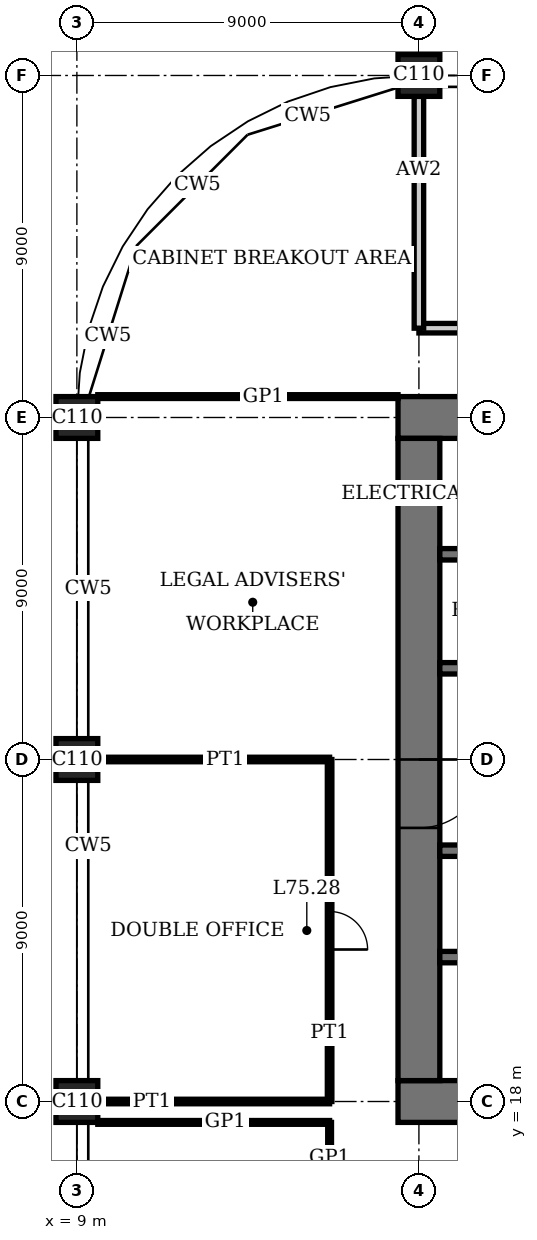
"""IFC4 building model, lengths in metres.
Left out: names, types, materials, properties, quantities, classifications, styles, units other than length and angle.
Written with IfcOpenShell. Run it as: python <this file> out.ifc"""

import sys

from ifc_helpers import new_model, si_unit, direction, frame, frame_2d, origin, origin_2d, place, context, subcontext, project, spatial, rectangle, extrude, element, fill, save


model = new_model("IFC4")
c1 = context("Model", 3, precision=1e-05, world=origin(), true_north=direction((0.0, 1.0)))
c2 = subcontext(c1, "Body", "Model", "MODEL_VIEW")
j1 = project(units=[si_unit("LENGTHUNIT", "METRE"), si_unit("PLANEANGLEUNIT", "RADIAN")], contexts=[c1])
p1 = place(None, origin())
s1 = spatial("IfcSite", under=j1, at=p1, CompositionType="ELEMENT")
p2 = place(p1, origin())
s2 = spatial("IfcBuilding", under=s1, at=p2, CompositionType="ELEMENT")
p3 = place(p2, frame((0.0, 0.0, 307.4)))
s3 = spatial("IfcBuildingStorey", under=s2, at=p3, CompositionType="ELEMENT", Elevation=307.4)
for number, where, z_axis, x_axis in (
    (1, (9.0, 18.0, 0.0), (0.0, 0.0, 1.0), (1.0, 0.0, 0.0)),
    (2, (9.0, 27.0, 0.0), (0.0, 0.0, 1.0), (1.0, 0.0, 0.0)),
    (3, (9.0, 36.0, 0.0), (0.0, 0.0, 1.0), (1.0, 0.0, 0.0)),
    (4, (18.0, 45.0, 0.0), (0.0, 0.0, 1.0), (1.0, 0.0, 0.0)),
):
    element("IfcColumn", number, at=place(p3, frame(where, z_axis=z_axis, x_axis=x_axis)), inside=s3, PredefinedType="COLUMN", context=c2, shape_type="SweptSolid", body=[
        extrude(rectangle(XDim=1.1, YDim=1.1, at=origin_2d()), origin(), (0.0, 0.0, 1.0), 4.4),
    ])
p4 = place(p3, frame((17.45, 18.0, 0.0), z_axis=(0.0, 0.0, 1.0), x_axis=(1.0, 0.0, 0.0)))
e5 = element("IfcWall", 5, at=p4, inside=s3, PredefinedType="SHEAR", context=c2, shape_type="SweptSolid", body=[
    extrude(rectangle(XDim=28.1, YDim=1.1, at=frame_2d((14.05, 0.0))), origin(), (0.0, 0.0, 1.0), 4.4),
])
p5 = place(p4, frame((11.55, 0.0, 0.0)))
e6 = element("IfcOpeningElement", 6, at=p5, cuts=e5, PredefinedType="OPENING", context=c2, shape_type="SweptSolid", body=[
    extrude(rectangle(XDim=1.0, YDim=2.4, at=frame_2d((0.5, 1.2))), frame((0.0, 0.56, 0.0), z_axis=(0.0, -1.0, 0.0), x_axis=(1.0, 0.0, 0.0)), (0.0, 0.0, 1.0), 1.12),
])
p6 = place(p4, frame((16.55, 0.0, 0.0)))
e7 = element("IfcOpeningElement", 7, at=p6, cuts=e5, PredefinedType="OPENING", context=c2, shape_type="SweptSolid", body=[
    extrude(rectangle(XDim=1.0, YDim=2.4, at=frame_2d((0.5, 1.2))), frame((0.0, 0.56, 0.0), z_axis=(0.0, -1.0, 0.0), x_axis=(1.0, 0.0, 0.0)), (0.0, 0.0, 1.0), 1.12),
])
p7 = place(p4, frame((20.0, 0.0, 0.0)))
e8 = element("IfcOpeningElement", 8, at=p7, cuts=e5, PredefinedType="OPENING", context=c2, shape_type="SweptSolid", body=[
    extrude(rectangle(XDim=1.1, YDim=2.4, at=frame_2d((0.55, 1.2))), frame((0.0, 0.56, 0.0), z_axis=(0.0, -1.0, 0.0), x_axis=(1.0, 0.0, 0.0)), (0.0, 0.0, 1.0), 1.12),
])
p8 = place(p4, frame((24.05, 0.0, 0.0)))
e9 = element("IfcOpeningElement", 9, at=p8, cuts=e5, PredefinedType="OPENING", context=c2, shape_type="SweptSolid", body=[
    extrude(rectangle(XDim=1.0, YDim=2.4, at=frame_2d((0.5, 1.2))), frame((0.0, 0.56, 0.0), z_axis=(0.0, -1.0, 0.0), x_axis=(1.0, 0.0, 0.0)), (0.0, 0.0, 1.0), 1.12),
])
p9 = place(p3, frame((45.55, 36.0, 0.0), z_axis=(0.0, 0.0, 1.0), x_axis=(-1.0, 0.0, 0.0)))
e10 = element("IfcWall", 10, at=p9, inside=s3, PredefinedType="SHEAR", context=c2, shape_type="SweptSolid", body=[
    extrude(rectangle(XDim=28.1, YDim=1.1, at=frame_2d((14.05, 0.0))), origin(), (0.0, 0.0, 1.0), 4.4),
])
p10 = place(p9, frame((11.55, 0.0, 0.0)))
e11 = element("IfcOpeningElement", 11, at=p10, cuts=e10, PredefinedType="OPENING", context=c2, shape_type="SweptSolid", body=[
    extrude(rectangle(XDim=1.0, YDim=2.4, at=frame_2d((0.5, 1.2))), frame((0.0, 0.56, 0.0), z_axis=(0.0, -1.0, 0.0), x_axis=(1.0, 0.0, 0.0)), (0.0, 0.0, 1.0), 1.12),
])
p11 = place(p9, frame((16.55, 0.0, 0.0)))
e12 = element("IfcOpeningElement", 12, at=p11, cuts=e10, PredefinedType="OPENING", context=c2, shape_type="SweptSolid", body=[
    extrude(rectangle(XDim=1.0, YDim=2.4, at=frame_2d((0.5, 1.2))), frame((0.0, 0.56, 0.0), z_axis=(0.0, -1.0, 0.0), x_axis=(1.0, 0.0, 0.0)), (0.0, 0.0, 1.0), 1.12),
])
p12 = place(p9, frame((20.0, 0.0, 0.0)))
e13 = element("IfcOpeningElement", 13, at=p12, cuts=e10, PredefinedType="OPENING", context=c2, shape_type="SweptSolid", body=[
    extrude(rectangle(XDim=1.1, YDim=2.4, at=frame_2d((0.55, 1.2))), frame((0.0, 0.56, 0.0), z_axis=(0.0, -1.0, 0.0), x_axis=(1.0, 0.0, 0.0)), (0.0, 0.0, 1.0), 1.12),
])
p13 = place(p9, frame((24.05, 0.0, 0.0)))
e14 = element("IfcOpeningElement", 14, at=p13, cuts=e10, PredefinedType="OPENING", context=c2, shape_type="SweptSolid", body=[
    extrude(rectangle(XDim=1.0, YDim=2.4, at=frame_2d((0.5, 1.2))), frame((0.0, 0.56, 0.0), z_axis=(0.0, -1.0, 0.0), x_axis=(1.0, 0.0, 0.0)), (0.0, 0.0, 1.0), 1.12),
])
p14 = place(p3, frame((18.0, 35.45, 0.0), z_axis=(0.0, 0.0, 1.0), x_axis=(0.0, -1.0, 0.0)))
e15 = element("IfcWall", 15, at=p14, inside=s3, PredefinedType="SHEAR", context=c2, shape_type="SweptSolid", body=[
    extrude(rectangle(XDim=16.9, YDim=1.1, at=frame_2d((8.45, 0.0))), origin(), (0.0, 0.0, 1.0), 4.4),
])
p15 = place(p14, frame((8.45, 0.0, 0.0)))
e16 = element("IfcOpeningElement", 16, at=p15, cuts=e15, PredefinedType="OPENING", context=c2, shape_type="SweptSolid", body=[
    extrude(rectangle(XDim=1.8, YDim=2.4, at=frame_2d((0.9, 1.2))), frame((0.0, 0.56, 0.0), z_axis=(0.0, -1.0, 0.0), x_axis=(1.0, 0.0, 0.0)), (0.0, 0.0, 1.0), 1.12),
])
p16 = place(p3, frame((18.55, 21.8, 0.0), z_axis=(0.0, 0.0, 1.0), x_axis=(1.0, 0.0, 0.0)))
e17 = element("IfcWall", 17, at=p16, inside=s3, PredefinedType="SHEAR", context=c2, shape_type="SweptSolid", body=[
    extrude(rectangle(XDim=8.3, YDim=0.3, at=frame_2d((4.15, 0.0))), origin(), (0.0, 0.0, 1.0), 4.4),
])
p17 = place(p16, frame((6.85, 0.0, 0.0)))
e18 = element("IfcOpeningElement", 18, at=p17, cuts=e17, PredefinedType="OPENING", context=c2, shape_type="SweptSolid", body=[
    extrude(rectangle(XDim=1.0, YDim=2.4, at=frame_2d((0.5, 1.2))), frame((0.0, 0.16, 0.0), z_axis=(0.0, -1.0, 0.0), x_axis=(1.0, 0.0, 0.0)), (0.0, 0.0, 1.0), 0.32),
])
p18 = place(p3, frame((18.55, 24.6, 0.0), z_axis=(0.0, 0.0, 1.0), x_axis=(1.0, 0.0, 0.0)))
e19 = element("IfcWall", 19, at=p18, inside=s3, PredefinedType="SHEAR", context=c2, shape_type="SweptSolid", body=[
    extrude(rectangle(XDim=25.9, YDim=0.3, at=frame_2d((12.95, 0.0))), origin(), (0.0, 0.0, 1.0), 4.4),
])
p19 = place(p18, frame((4.95, 0.0, 0.0)))
e20 = element("IfcOpeningElement", 20, at=p19, cuts=e19, PredefinedType="OPENING", context=c2, shape_type="SweptSolid", body=[
    extrude(rectangle(XDim=1.0, YDim=2.4, at=frame_2d((0.5, 1.2))), frame((0.0, 0.16, 0.0), z_axis=(0.0, -1.0, 0.0), x_axis=(1.0, 0.0, 0.0)), (0.0, 0.0, 1.0), 0.32),
])
p20 = place(p18, frame((24.5, 0.0, 0.0)))
e21 = element("IfcOpeningElement", 21, at=p20, cuts=e19, PredefinedType="OPENING", context=c2, shape_type="SweptSolid", body=[
    extrude(rectangle(XDim=0.9, YDim=2.1, at=frame_2d((0.45, 1.05))), frame((0.0, 0.16, 0.0), z_axis=(0.0, -1.0, 0.0), x_axis=(1.0, 0.0, 0.0)), (0.0, 0.0, 1.0), 0.32),
])
p21 = place(p18, frame((9.4, 0.0, 0.0)))
e22 = element("IfcOpeningElement", 22, at=p21, cuts=e19, PredefinedType="OPENING", context=c2, shape_type="SweptSolid", body=[
    extrude(rectangle(XDim=1.1, YDim=2.4, at=frame_2d((0.55, 1.2))), frame((0.0, 0.16, 0.0), z_axis=(0.0, -1.0, 0.0), x_axis=(1.0, 0.0, 0.0)), (0.0, 0.0, 1.0), 0.32),
])
p22 = place(p18, frame((12.4, 0.0, 0.0)))
e23 = element("IfcOpeningElement", 23, at=p22, cuts=e19, PredefinedType="OPENING", context=c2, shape_type="SweptSolid", body=[
    extrude(rectangle(XDim=1.1, YDim=2.4, at=frame_2d((0.55, 1.2))), frame((0.0, 0.16, 0.0), z_axis=(0.0, -1.0, 0.0), x_axis=(1.0, 0.0, 0.0)), (0.0, 0.0, 1.0), 0.32),
])
p23 = place(p18, frame((15.4, 0.0, 0.0)))
e24 = element("IfcOpeningElement", 24, at=p23, cuts=e19, PredefinedType="OPENING", context=c2, shape_type="SweptSolid", body=[
    extrude(rectangle(XDim=1.1, YDim=2.4, at=frame_2d((0.55, 1.2))), frame((0.0, 0.16, 0.0), z_axis=(0.0, -1.0, 0.0), x_axis=(1.0, 0.0, 0.0)), (0.0, 0.0, 1.0), 0.32),
])
p24 = place(p18, frame((18.4, 0.0, 0.0)))
e25 = element("IfcOpeningElement", 25, at=p24, cuts=e19, PredefinedType="OPENING", context=c2, shape_type="SweptSolid", body=[
    extrude(rectangle(XDim=1.1, YDim=2.4, at=frame_2d((0.55, 1.2))), frame((0.0, 0.16, 0.0), z_axis=(0.0, -1.0, 0.0), x_axis=(1.0, 0.0, 0.0)), (0.0, 0.0, 1.0), 0.32),
])
p25 = place(p18, frame((21.3, 0.0, 0.0)))
e26 = element("IfcOpeningElement", 26, at=p25, cuts=e19, PredefinedType="OPENING", context=c2, shape_type="SweptSolid", body=[
    extrude(rectangle(XDim=1.3, YDim=2.4, at=frame_2d((0.65, 1.2))), frame((0.0, 0.16, 0.0), z_axis=(0.0, -1.0, 0.0), x_axis=(1.0, 0.0, 0.0)), (0.0, 0.0, 1.0), 0.32),
])
p26 = place(p3, frame((18.55, 29.4, 0.0), z_axis=(0.0, 0.0, 1.0), x_axis=(1.0, 0.0, 0.0)))
e27 = element("IfcWall", 27, at=p26, inside=s3, PredefinedType="SHEAR", context=c2, shape_type="SweptSolid", body=[
    extrude(rectangle(XDim=25.9, YDim=0.3, at=frame_2d((12.95, 0.0))), origin(), (0.0, 0.0, 1.0), 4.4),
])
p27 = place(p26, frame((19.95, 0.0, 0.0)))
e28 = element("IfcOpeningElement", 28, at=p27, cuts=e27, PredefinedType="OPENING", context=c2, shape_type="SweptSolid", body=[
    extrude(rectangle(XDim=1.0, YDim=2.4, at=frame_2d((0.5, 1.2))), frame((0.0, 0.16, 0.0), z_axis=(0.0, -1.0, 0.0), x_axis=(1.0, 0.0, 0.0)), (0.0, 0.0, 1.0), 0.32),
])
p28 = place(p26, frame((0.5, 0.0, 0.0)))
e29 = element("IfcOpeningElement", 29, at=p28, cuts=e27, PredefinedType="OPENING", context=c2, shape_type="SweptSolid", body=[
    extrude(rectangle(XDim=0.9, YDim=2.1, at=frame_2d((0.45, 1.05))), frame((0.0, 0.16, 0.0), z_axis=(0.0, -1.0, 0.0), x_axis=(1.0, 0.0, 0.0)), (0.0, 0.0, 1.0), 0.32),
])
p29 = place(p26, frame((15.45, 0.0, 0.0)))
e30 = element("IfcOpeningElement", 30, at=p29, cuts=e27, PredefinedType="OPENING", context=c2, shape_type="SweptSolid", body=[
    extrude(rectangle(XDim=1.0, YDim=2.4, at=frame_2d((0.5, 1.2))), frame((0.0, 0.16, 0.0), z_axis=(0.0, -1.0, 0.0), x_axis=(1.0, 0.0, 0.0)), (0.0, 0.0, 1.0), 0.32),
])
p30 = place(p26, frame((12.45, 0.0, 0.0)))
e31 = element("IfcOpeningElement", 31, at=p30, cuts=e27, PredefinedType="OPENING", context=c2, shape_type="SweptSolid", body=[
    extrude(rectangle(XDim=1.0, YDim=2.4, at=frame_2d((0.5, 1.2))), frame((0.0, 0.16, 0.0), z_axis=(0.0, -1.0, 0.0), x_axis=(1.0, 0.0, 0.0)), (0.0, 0.0, 1.0), 0.32),
])
p31 = place(p26, frame((9.45, 0.0, 0.0)))
e32 = element("IfcOpeningElement", 32, at=p31, cuts=e27, PredefinedType="OPENING", context=c2, shape_type="SweptSolid", body=[
    extrude(rectangle(XDim=1.0, YDim=2.4, at=frame_2d((0.5, 1.2))), frame((0.0, 0.16, 0.0), z_axis=(0.0, -1.0, 0.0), x_axis=(1.0, 0.0, 0.0)), (0.0, 0.0, 1.0), 0.32),
])
p32 = place(p26, frame((6.45, 0.0, 0.0)))
e33 = element("IfcOpeningElement", 33, at=p32, cuts=e27, PredefinedType="OPENING", context=c2, shape_type="SweptSolid", body=[
    extrude(rectangle(XDim=1.0, YDim=2.4, at=frame_2d((0.5, 1.2))), frame((0.0, 0.16, 0.0), z_axis=(0.0, -1.0, 0.0), x_axis=(1.0, 0.0, 0.0)), (0.0, 0.0, 1.0), 0.32),
])
p33 = place(p26, frame((3.3, 0.0, 0.0)))
e34 = element("IfcOpeningElement", 34, at=p33, cuts=e27, PredefinedType="OPENING", context=c2, shape_type="SweptSolid", body=[
    extrude(rectangle(XDim=1.3, YDim=2.4, at=frame_2d((0.65, 1.2))), frame((0.0, 0.16, 0.0), z_axis=(0.0, -1.0, 0.0), x_axis=(1.0, 0.0, 0.0)), (0.0, 0.0, 1.0), 0.32),
])
p34 = place(p3, frame((18.55, 32.4, 0.0), z_axis=(0.0, 0.0, 1.0), x_axis=(1.0, 0.0, 0.0)))
e35 = element("IfcWall", 35, at=p34, inside=s3, PredefinedType="SHEAR", context=c2, shape_type="SweptSolid", body=[
    extrude(rectangle(XDim=17.3, YDim=0.3, at=frame_2d((8.65, 0.0))), origin(), (0.0, 0.0, 1.0), 4.4),
])
p35 = place(p3, frame((9.55, 17.45, 0.0), z_axis=(0.0, 0.0, 1.0), x_axis=(1.0, 0.0, 0.0)))
e36 = element("IfcWall", 36, at=p35, inside=s3, PredefinedType="PARTITIONING", context=c2, shape_type="SweptSolid", body=[
    extrude(rectangle(XDim=6.1, YDim=0.1, at=frame_2d((3.05, 0.0))), origin(), (0.0, 0.0, 1.0), 4.05),
])
for number, where, z_axis, x_axis in (
    (37, (9.55, 18.0, 0.0), (0.0, 0.0, 1.0), (1.0, 0.0, 0.0)),
    (38, (9.55, 27.0, 0.0), (0.0, 0.0, 1.0), (1.0, 0.0, 0.0)),
):
    element("IfcWall", number, at=place(p3, frame(where, z_axis=z_axis, x_axis=x_axis)), inside=s3, PredefinedType="PARTITIONING", context=c2, shape_type="SweptSolid", body=[
        extrude(rectangle(XDim=6.1, YDim=0.12, at=frame_2d((3.05, 0.0))), origin(), (0.0, 0.0, 1.0), 3.25),
    ])
p36 = place(p3, frame((9.55, 36.55, 0.0), z_axis=(0.0, 0.0, 1.0), x_axis=(1.0, 0.0, 0.0)))
e39 = element("IfcWall", 39, at=p36, inside=s3, PredefinedType="PARTITIONING", context=c2, shape_type="SweptSolid", body=[
    extrude(rectangle(XDim=7.9, YDim=0.1, at=frame_2d((3.95, 0.0))), origin(), (0.0, 0.0, 1.0), 4.05),
])
p37 = place(p3, frame((18.0, 38.35, 0.0), z_axis=(0.0, 0.0, 1.0), x_axis=(1.0, 0.0, 0.0)))
e40 = element("IfcWall", 40, at=p37, inside=s3, PredefinedType="PARTITIONING", context=c2, shape_type="SweptSolid", body=[
    extrude(rectangle(XDim=18.0, YDim=0.25, at=frame_2d((9.0, 0.0))), origin(), (0.0, 0.0, 1.0), 4.05),
])
p38 = place(p37, frame((8.1, 0.0, 0.0)))
e41 = element("IfcOpeningElement", 41, at=p38, cuts=e40, PredefinedType="OPENING", context=c2, shape_type="SweptSolid", body=[
    extrude(rectangle(XDim=1.8, YDim=2.4, at=frame_2d((0.9, 1.2))), frame((0.0, 0.135, 0.0), z_axis=(0.0, -1.0, 0.0), x_axis=(1.0, 0.0, 0.0)), (0.0, 0.0, 1.0), 0.27),
])
p39 = place(p3, frame((15.65, 18.0, 0.0), z_axis=(0.0, 0.0, 1.0), x_axis=(0.0, 1.0, 0.0)))
e42 = element("IfcWall", 42, at=p39, inside=s3, PredefinedType="PARTITIONING", context=c2, shape_type="SweptSolid", body=[
    extrude(rectangle(XDim=9.0, YDim=0.12, at=frame_2d((4.5, 0.0))), origin(), (0.0, 0.0, 1.0), 4.05),
])
p40 = place(p39, frame((4.0, 0.0, 0.0)))
e43 = element("IfcOpeningElement", 43, at=p40, cuts=e42, PredefinedType="OPENING", context=c2, shape_type="SweptSolid", body=[
    extrude(rectangle(XDim=1.0, YDim=2.4, at=frame_2d((0.5, 1.2))), frame((0.0, 0.07, 0.0), z_axis=(0.0, -1.0, 0.0), x_axis=(1.0, 0.0, 0.0)), (0.0, 0.0, 1.0), 0.14),
])
p41 = place(p3, frame((15.65, 15.6, 0.0), z_axis=(0.0, 0.0, 1.0), x_axis=(0.0, 1.0, 0.0)))
e44 = element("IfcWall", 44, at=p41, inside=s3, PredefinedType="PARTITIONING", context=c2, shape_type="SweptSolid", body=[
    extrude(rectangle(XDim=1.85, YDim=0.1, at=frame_2d((0.925, 0.0))), origin(), (0.0, 0.0, 1.0), 4.05),
])
p42 = place(p3, frame((18.0, 38.35, 0.0), z_axis=(0.0, 0.0, 1.0), x_axis=(0.0, 1.0, 0.0)))
e45 = element("IfcWall", 45, at=p42, inside=s3, PredefinedType="PARTITIONING", context=c2, shape_type="SweptSolid", body=[
    extrude(rectangle(XDim=6.1, YDim=0.25, at=frame_2d((3.05, 0.0))), origin(), (0.0, 0.0, 1.0), 3.25),
])
p43 = place(p15, origin())
e46 = element("IfcDoor", 46, at=p43, inside=s3, OperationType="DOUBLE_DOOR_DOUBLE_SWING", PredefinedType="DOOR", context=c2, shape_type="SweptSolid", body=[
    extrude(rectangle(XDim=1.8, YDim=2.4, at=frame_2d((0.9, 1.2))), frame((0.0, 0.03, 0.0), z_axis=(0.0, -1.0, 0.0), x_axis=(1.0, 0.0, 0.0)), (0.0, 0.0, 1.0), 0.06),
    extrude(rectangle(XDim=0.04, YDim=2.4, at=frame_2d((0.02, 1.2))), frame((0.0, 0.55, 0.0), z_axis=(0.0, -1.0, 0.0), x_axis=(1.0, 0.0, 0.0)), (0.0, 0.0, 1.0), 1.1),
    extrude(rectangle(XDim=0.04, YDim=2.4, at=frame_2d((1.78, 1.2))), frame((0.0, 0.55, 0.0), z_axis=(0.0, -1.0, 0.0), x_axis=(1.0, 0.0, 0.0)), (0.0, 0.0, 1.0), 1.1),
    extrude(rectangle(XDim=1.8, YDim=0.04, at=frame_2d((0.9, 2.38))), frame((0.0, 0.55, 0.0), z_axis=(0.0, -1.0, 0.0), x_axis=(1.0, 0.0, 0.0)), (0.0, 0.0, 1.0), 1.1),
])
fill(e16, e46)
p44 = place(p40, origin())
e47 = element("IfcDoor", 47, at=p44, inside=s3, OperationType="SINGLE_SWING_LEFT", PredefinedType="DOOR", context=c2, shape_type="SweptSolid", body=[
    extrude(rectangle(XDim=1.0, YDim=2.4, at=frame_2d((0.5, 1.2))), frame((0.0, 0.025, 0.0), z_axis=(0.0, -1.0, 0.0), x_axis=(1.0, 0.0, 0.0)), (0.0, 0.0, 1.0), 0.05),
])
fill(e43, e47)
save(model, sys.argv[1])
